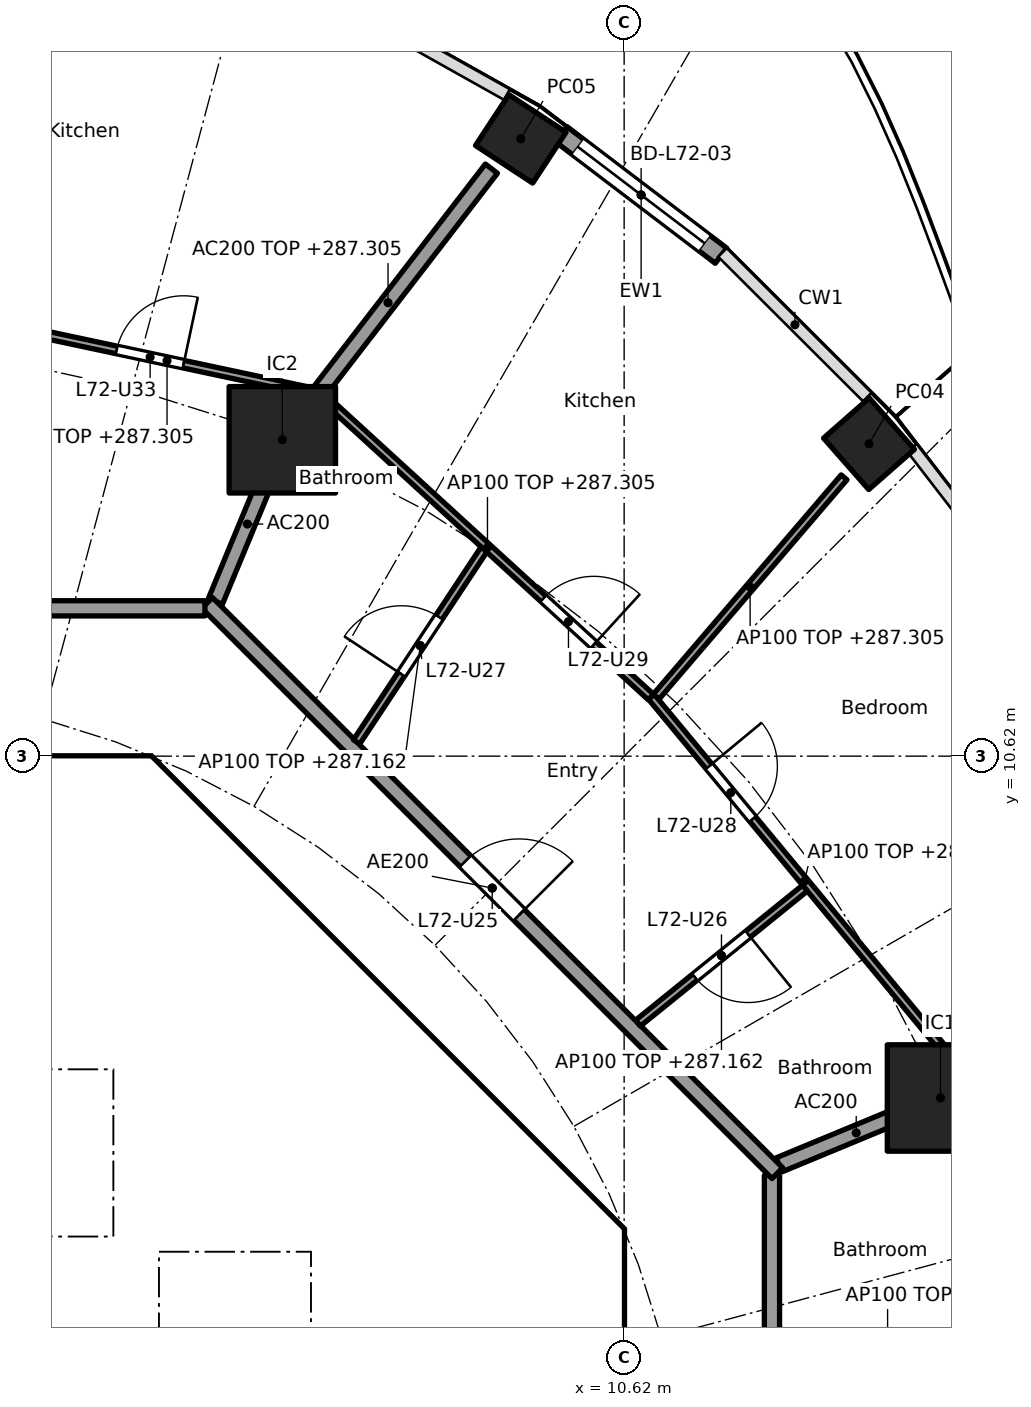
"""IFC4 building model, lengths in metres.
Left out: names, types, materials, properties, quantities, classifications, styles, units other than length and angle.
Written with IfcOpenShell. Run it as: python <this file> out.ifc"""

import sys

from ifc_helpers import new_model, si_unit, direction, frame, frame_2d, origin, origin_2d, place, context, subcontext, project, spatial, polyline, rectangle, hollow_rectangle, outline, extrude, element, fill, save


model = new_model("IFC4")
c1 = context("Model", 3, precision=1e-05, world=origin(), true_north=direction((0.0, 1.0)))
c2 = subcontext(c1, "Body", "Model", "MODEL_VIEW")
j1 = project(units=[si_unit("LENGTHUNIT", "METRE"), si_unit("PLANEANGLEUNIT", "RADIAN")], contexts=[c1])
p1 = place(None, origin())
s1 = spatial("IfcSite", under=j1, at=p1, CompositionType="ELEMENT")
p2 = place(p1, origin())
s2 = spatial("IfcBuilding", under=s1, at=p2, CompositionType="ELEMENT")
p3 = place(p2, frame((0.0, 0.0, 284.4)))
s3 = spatial("IfcBuildingStorey", under=s2, at=p3, CompositionType="ELEMENT", Elevation=284.4)
for number, where, z_axis, x_axis in (
    (1, (13.841, 14.73, 0.0), (0.0, 0.0, 1.0), (-0.66, 0.751, 0.0)),
    (2, (9.26, 18.741, 0.0), (0.0, 0.0, 1.0), (-0.836, 0.549, 0.0)),
):
    element("IfcColumn", number, at=place(p3, frame(where, z_axis=z_axis, x_axis=x_axis)), inside=s3, PredefinedType="COLUMN", context=c2, shape_type="SweptSolid", body=[
        extrude(hollow_rectangle(XDim=0.9, YDim=0.8, WallThickness=0.028, at=origin_2d()), origin(), (0.0, 0.0, 1.0), 3.7),
    ])
for number, where, z_axis, x_axis in (
    (3, (14.782, 6.123, 0.0), (0.0, 0.0, 1.0), (1.0, 0.0, 0.0)),
    (4, (6.123, 14.782, 0.0), (0.0, 0.0, 1.0), (1.0, 0.0, 0.0)),
):
    element("IfcColumn", number, at=place(p3, frame(where, z_axis=z_axis, x_axis=x_axis)), inside=s3, PredefinedType="COLUMN", context=c2, shape_type="SweptSolid", body=[
        extrude(rectangle(XDim=1.4, YDim=1.4, at=origin_2d()), origin(), (0.0, 0.0, 1.0), 3.7),
    ])
p4 = place(p3, frame((9.792, 18.802, 0.0), z_axis=(0.0, 0.0, 1.0), x_axis=(0.796010739377, -0.605282498339, 0.0)))
e5 = element("IfcWall", 5, at=p4, inside=s3, PredefinedType="SOLIDWALL", context=c2, shape_type="SweptSolid", body=[
    extrude(rectangle(XDim=2.641, YDim=0.25, at=frame_2d((1.32, 0.0))), origin(), (0.0, 0.0, 1.0), 3.44),
])
p5 = place(p4, frame((0.27, 0.0, 0.0)))
e6 = element("IfcOpeningElement", 6, at=p5, cuts=e5, PredefinedType="OPENING", context=c2, shape_type="SweptSolid", body=[
    extrude(rectangle(XDim=2.1, YDim=2.4, at=frame_2d((1.05, 1.2))), frame((0.0, 0.135, 0.0), z_axis=(0.0, -1.0, 0.0), x_axis=(1.0, 0.0, 0.0)), (0.0, 0.0, 1.0), 0.27),
])
p6 = place(p3, frame((9.988, 4.613, 0.0), z_axis=(0.0, 0.0, 1.0), x_axis=(-0.707106781187, 0.707106781187, 0.0)))
e7 = element("IfcWall", 7, at=p6, inside=s3, PredefinedType="SHEAR", context=c2, shape_type="SweptSolid", body=[
    extrude(rectangle(XDim=7.602, YDim=0.6, at=frame_2d((3.801, 0.0))), origin(), (0.0, 0.0, 1.0), 3.44),
])
p7 = place(p6, frame((3.201, 0.0, 0.0)))
e8 = element("IfcOpeningElement", 8, at=p7, cuts=e7, PredefinedType="OPENING", context=c2, shape_type="SweptSolid", body=[
    extrude(rectangle(XDim=1.2, YDim=2.1, at=frame_2d((0.6, 1.05))), frame((0.0, 0.31, 0.0), z_axis=(0.0, -1.0, 0.0), x_axis=(1.0, 0.0, 0.0)), (0.0, 0.0, 1.0), 0.62),
])
p8 = place(p3, frame((4.0, 4.3, 0.0), z_axis=(0.0, 0.0, 1.0), x_axis=(0.0, 1.0, 0.0)))
e9 = element("IfcWall", 9, at=p8, inside=s3, PredefinedType="SOLIDWALL", context=c2, shape_type="SweptSolid", body=[
    extrude(rectangle(XDim=2.2, YDim=0.2, at=frame_2d((1.1, 0.0))), origin(), (0.0, 0.0, 1.0), 3.44),
])
p9 = place(p8, frame((0.55, 0.0, 0.0)))
e10 = element("IfcOpeningElement", 10, at=p9, cuts=e9, PredefinedType="OPENING", context=c2, shape_type="SweptSolid", body=[
    extrude(rectangle(XDim=1.1, YDim=2.1, at=frame_2d((0.55, 1.05))), frame((0.0, 0.11, 0.0), z_axis=(0.0, -1.0, 0.0), x_axis=(1.0, 0.0, 0.0)), (0.0, 0.0, 1.0), 0.22),
])
p10 = place(p3, frame((6.7, 4.0, 0.0), z_axis=(0.0, 0.0, 1.0), x_axis=(1.0, 0.0, 0.0)))
e11 = element("IfcWall", 11, at=p10, inside=s3, PredefinedType="SOLIDWALL", context=c2, shape_type="SweptSolid", body=[
    extrude(rectangle(XDim=3.325, YDim=0.2, at=frame_2d((1.662, 0.0))), origin(), (0.0, 0.0, 1.0), 3.44),
])
p11 = place(p10, frame((1.25, 0.0, 0.0)))
e12 = element("IfcOpeningElement", 12, at=p11, cuts=e11, PredefinedType="OPENING", context=c2, shape_type="SweptSolid", body=[
    extrude(rectangle(XDim=1.1, YDim=2.1, at=frame_2d((0.55, 1.05))), frame((0.0, 0.11, 0.0), z_axis=(0.0, -1.0, 0.0), x_axis=(1.0, 0.0, 0.0)), (0.0, 0.0, 1.0), 0.22),
])
p12 = place(p3, frame((4.0, 7.025, 0.0), z_axis=(0.0, 0.0, 1.0), x_axis=(0.0, 1.0, 0.0)))
e13 = element("IfcWall", 13, at=p12, inside=s3, PredefinedType="SOLIDWALL", context=c2, shape_type="SweptSolid", body=[
    extrude(rectangle(XDim=3.0, YDim=0.2, at=frame_2d((1.5, 0.0))), origin(), (0.0, 0.0, 1.0), 3.44),
])
p13 = place(p12, frame((0.925, 0.0, 0.0)))
e14 = element("IfcOpeningElement", 14, at=p13, cuts=e13, PredefinedType="OPENING", context=c2, shape_type="SweptSolid", body=[
    extrude(rectangle(XDim=1.1, YDim=2.1, at=frame_2d((0.55, 1.05))), frame((0.0, 0.11, 0.0), z_axis=(0.0, -1.0, 0.0), x_axis=(1.0, 0.0, 0.0)), (0.0, 0.0, 1.0), 0.22),
])
p14 = place(p3, origin())
e15 = element("IfcWall", 15, at=p14, inside=s3, PredefinedType="SHEAR", context=c2, shape_type="SweptSolid", body=[
    extrude(outline(polyline([(-4.152, 10.025), (-4.401, 9.776), (-4.825, 10.2), (-4.401, 10.625), (4.401, 10.625), (4.825, 10.2), (4.401, 9.776), (4.152, 10.025), (-4.152, 10.025)])), origin(), (0.0, 0.0, 1.0), 3.44),
])
p15 = place(p3, origin())
e16 = element("IfcWall", 16, at=p15, inside=s3, PredefinedType="SHEAR", context=c2, shape_type="SweptSolid", body=[
    extrude(outline(polyline([(9.776, -4.401), (10.025, -4.152), (10.025, -3.801), (10.025, 4.152), (9.776, 4.401), (10.2, 4.825), (10.625, 4.401), (10.625, -4.401), (10.2, -4.825), (9.776, -4.401)])), origin(), (0.0, 0.0, 1.0), 3.44),
])
p16 = place(p3, origin())
e17 = element("IfcWall", 17, at=p16, inside=s3, PredefinedType="SOLIDWALL", context=c2, shape_type="SweptSolid", body=[
    extrude(outline(polyline([(-6.7, 4.3), (6.7, 4.3), (6.7, 2.1), (6.5, 2.1), (6.5, 4.1), (4.5, 4.1), (4.5, 2.1), (4.3, 2.1), (4.3, 4.1), (0.1, 4.1), (0.1, 2.1), (-0.1, 2.1), (-0.1, 4.1), (-2.1, 4.1), (-2.1, 2.1), (-2.3, 2.1), (-2.3, 4.1), (-6.5, 4.1), (-6.5, 2.1), (-6.7, 2.1), (-6.7, 4.3)])), origin(), (0.0, 0.0, 1.0), 3.44),
])
p17 = place(p3, origin())
e18 = element("IfcWall", 18, at=p17, inside=s3, PredefinedType="SOLIDWALL", context=c2, shape_type="SweptSolid", body=[
    extrude(outline(polyline([(4.1, 6.5), (-4.1, 6.5), (-4.1, 7.025), (4.1, 7.025), (4.1, 6.5)])), origin(), (0.0, 0.0, 1.0), 3.44),
])
p18 = place(p3, origin())
e19 = element("IfcWall", 19, at=p18, inside=s3, PredefinedType="SOLIDWALL", context=c2, shape_type="SweptSolid", body=[
    extrude(outline(polyline([(7.025, -3.9), (6.7, -3.9), (6.7, 3.9), (7.025, 3.9), (7.025, -3.9)])), origin(), (0.0, 0.0, 1.0), 3.44),
])
p19 = place(p3, frame((12.657, 5.243, 0.0), z_axis=(0.0, 0.0, 1.0), x_axis=(0.923853160736, 0.382747093259, 0.0)))
e20 = element("IfcWall", 20, at=p19, inside=s3, PredefinedType="PARTITIONING", context=c2, shape_type="SweptSolid", body=[
    extrude(rectangle(XDim=2.2, YDim=0.2, at=frame_2d((1.1, 0.0))), origin(), (0.0, 0.0, 1.0), 3.44),
])
p20 = place(p3, frame((14.814, 6.161, 0.0), z_axis=(0.0, 0.0, 1.0), x_axis=(0.638050520313, 0.769994502272, 0.0)))
e21 = element("IfcWall", 21, at=p20, inside=s3, PredefinedType="PARTITIONING", context=c2, shape_type="SweptSolid", body=[
    extrude(rectangle(XDim=3.673, YDim=0.2, at=frame_2d((1.836, 0.0))), origin(), (0.0, 0.0, 1.0), 3.44),
])
p21 = place(p3, frame((5.243, 12.657, 0.0), z_axis=(0.0, 0.0, 1.0), x_axis=(0.382691608661, 0.923876145736, 0.0)))
e22 = element("IfcWall", 22, at=p21, inside=s3, PredefinedType="PARTITIONING", context=c2, shape_type="SweptSolid", body=[
    extrude(rectangle(XDim=2.2, YDim=0.2, at=frame_2d((1.1, 0.0))), origin(), (0.0, 0.0, 1.0), 3.44),
])
p22 = place(p3, frame((6.154, 14.822, 0.0), z_axis=(0.0, 0.0, 1.0), x_axis=(0.610687612043, 0.791871606068, 0.0)))
e23 = element("IfcWall", 23, at=p22, inside=s3, PredefinedType="PARTITIONING", context=c2, shape_type="SweptSolid", body=[
    extrude(rectangle(XDim=4.455, YDim=0.2, at=frame_2d((2.228, 0.0))), origin(), (0.0, 0.0, 1.0), 2.905),
])
p23 = place(p3, frame((12.565, -5.104, 0.0), z_axis=(0.0, 0.0, 1.0), x_axis=(0.0, 1.0, 0.0)))
e24 = element("IfcWall", 24, at=p23, inside=s3, PredefinedType="PARTITIONING", context=c2, shape_type="SweptSolid", body=[
    extrude(rectangle(XDim=10.209, YDim=0.2, at=frame_2d((5.104, 0.0))), origin(), (0.0, 0.0, 1.0), 3.44),
])
p24 = place(p23, frame((4.604, 0.0, 0.0)))
e25 = element("IfcOpeningElement", 25, at=p24, cuts=e24, PredefinedType="OPENING", context=c2, shape_type="SweptSolid", body=[
    extrude(rectangle(XDim=1.0, YDim=2.1, at=frame_2d((0.5, 1.05))), frame((0.0, 0.11, 0.0), z_axis=(0.0, -1.0, 0.0), x_axis=(1.0, 0.0, 0.0)), (0.0, 0.0, 1.0), 0.22),
])
p25 = place(p3, frame((12.635, 5.134, 0.0), z_axis=(0.0, 0.0, 1.0), x_axis=(-0.707106781187, 0.707106781187, 0.0)))
e26 = element("IfcWall", 26, at=p25, inside=s3, PredefinedType="PARTITIONING", context=c2, shape_type="SweptSolid", body=[
    extrude(rectangle(XDim=10.609, YDim=0.2, at=frame_2d((5.305, 0.0))), origin(), (0.0, 0.0, 1.0), 3.44),
])
p26 = place(p25, frame((4.804, 0.0, 0.0)))
e27 = element("IfcOpeningElement", 27, at=p26, cuts=e26, PredefinedType="OPENING", context=c2, shape_type="SweptSolid", body=[
    extrude(rectangle(XDim=1.0, YDim=2.1, at=frame_2d((0.5, 1.05))), frame((0.0, 0.11, 0.0), z_axis=(0.0, -1.0, 0.0), x_axis=(1.0, 0.0, 0.0)), (0.0, 0.0, 1.0), 0.22),
])
p27 = place(p3, frame((5.104, 12.565, 0.0), z_axis=(0.0, 0.0, 1.0), x_axis=(-1.0, 0.0, 0.0)))
e28 = element("IfcWall", 28, at=p27, inside=s3, PredefinedType="PARTITIONING", context=c2, shape_type="SweptSolid", body=[
    extrude(rectangle(XDim=10.409, YDim=0.2, at=frame_2d((5.205, 0.0))), origin(), (0.0, 0.0, 1.0), 3.44),
])
p28 = place(p27, frame((6.339, 0.0, 0.0)))
e29 = element("IfcOpeningElement", 29, at=p28, cuts=e28, PredefinedType="OPENING", context=c2, shape_type="SweptSolid", body=[
    extrude(rectangle(XDim=1.0, YDim=2.1, at=frame_2d((0.5, 1.05))), frame((0.0, 0.11, 0.0), z_axis=(0.0, -1.0, 0.0), x_axis=(1.0, 0.0, 0.0)), (0.0, 0.0, 1.0), 0.22),
])
p29 = place(p3, frame((15.002, 6.543, 0.0), z_axis=(0.0, 0.0, 1.0), x_axis=(-0.637932656528, 0.770092154054, 0.0)))
e30 = element("IfcWall", 30, at=p29, inside=s3, PredefinedType="PARTITIONING", context=c2, shape_type="SweptSolid", body=[
    extrude(rectangle(XDim=6.311, YDim=0.1, at=frame_2d((3.155, 0.0))), origin(), (0.0, 0.0, 1.0), 2.905),
])
p30 = place(p29, frame((4.22, 0.0, 0.0)))
e31 = element("IfcOpeningElement", 31, at=p30, cuts=e30, PredefinedType="OPENING", context=c2, shape_type="SweptSolid", body=[
    extrude(rectangle(XDim=0.9, YDim=2.1, at=frame_2d((0.45, 1.05))), frame((0.0, 0.06, 0.0), z_axis=(0.0, -1.0, 0.0), x_axis=(1.0, 0.0, 0.0)), (0.0, 0.0, 1.0), 0.12),
])
p31 = place(p3, frame((10.802, 7.107, 0.0), z_axis=(0.0, 0.0, 1.0), x_axis=(0.777526610395, 0.628850037868, 0.0)))
e32 = element("IfcWall", 32, at=p31, inside=s3, PredefinedType="PARTITIONING", context=c2, shape_type="SweptSolid", body=[
    extrude(rectangle(XDim=2.824, YDim=0.1, at=frame_2d((1.412, 0.0))), origin(), (0.0, 0.0, 1.0), 2.762),
])
p32 = place(p31, frame((0.962, 0.0, 0.0)))
e33 = element("IfcOpeningElement", 33, at=p32, cuts=e32, PredefinedType="OPENING", context=c2, shape_type="SweptSolid", body=[
    extrude(rectangle(XDim=0.9, YDim=2.1, at=frame_2d((0.45, 1.05))), frame((0.0, 0.06, 0.0), z_axis=(0.0, -1.0, 0.0), x_axis=(1.0, 0.0, 0.0)), (0.0, 0.0, 1.0), 0.12),
])
p33 = place(p3, frame((11.041, 11.402, 0.0), z_axis=(0.0, 0.0, 1.0), x_axis=(0.650558544325, 0.759456108282, 0.0)))
e34 = element("IfcWall", 34, at=p33, inside=s3, PredefinedType="PARTITIONING", context=c2, shape_type="SweptSolid", body=[
    extrude(rectangle(XDim=3.8, YDim=0.1, at=frame_2d((1.9, 0.0))), origin(), (0.0, 0.0, 1.0), 2.905),
])
p34 = place(p3, frame((10.972, 11.398, 0.0), z_axis=(0.0, 0.0, 1.0), x_axis=(-0.737830272434, 0.674986288069, 0.0)))
e35 = element("IfcWall", 35, at=p34, inside=s3, PredefinedType="PARTITIONING", context=c2, shape_type="SweptSolid", body=[
    extrude(rectangle(XDim=5.827, YDim=0.1, at=frame_2d((2.914, 0.0))), origin(), (0.0, 0.0, 1.0), 2.905),
])
p35 = place(p34, frame((1.019, 0.0, 0.0)))
e36 = element("IfcOpeningElement", 36, at=p35, cuts=e35, PredefinedType="OPENING", context=c2, shape_type="SweptSolid", body=[
    extrude(rectangle(XDim=0.9, YDim=2.1, at=frame_2d((0.45, 1.05))), frame((0.0, 0.06, 0.0), z_axis=(0.0, -1.0, 0.0), x_axis=(1.0, 0.0, 0.0)), (0.0, 0.0, 1.0), 0.12),
])
p36 = place(p3, frame((7.1, 10.808, 0.0), z_axis=(0.0, 0.0, 1.0), x_axis=(0.55204370542, 0.833815175747, 0.0)))
e37 = element("IfcWall", 37, at=p36, inside=s3, PredefinedType="PARTITIONING", context=c2, shape_type="SweptSolid", body=[
    extrude(rectangle(XDim=3.036, YDim=0.1, at=frame_2d((1.518, 0.0))), origin(), (0.0, 0.0, 1.0), 2.762),
])
p37 = place(p36, frame((1.068, 0.0, 0.0)))
e38 = element("IfcOpeningElement", 38, at=p37, cuts=e37, PredefinedType="OPENING", context=c2, shape_type="SweptSolid", body=[
    extrude(rectangle(XDim=0.9, YDim=2.1, at=frame_2d((0.45, 1.05))), frame((0.0, 0.06, 0.0), z_axis=(0.0, -1.0, 0.0), x_axis=(1.0, 0.0, 0.0)), (0.0, 0.0, 1.0), 0.12),
])
p38 = place(p3, frame((6.5, 15.419, 0.0), z_axis=(0.0, 0.0, 1.0), x_axis=(-0.978053492557, 0.208353943321, 0.0)))
e39 = element("IfcWall", 39, at=p38, inside=s3, PredefinedType="PARTITIONING", context=c2, shape_type="SweptSolid", body=[
    extrude(rectangle(XDim=3.874, YDim=0.1, at=frame_2d((1.937, 0.0))), origin(), (0.0, 0.0, 1.0), 2.905),
])
p39 = place(p38, frame((1.714, 0.0, 0.0)))
e40 = element("IfcOpeningElement", 40, at=p39, cuts=e39, PredefinedType="OPENING", context=c2, shape_type="SweptSolid", body=[
    extrude(rectangle(XDim=0.9, YDim=2.1, at=frame_2d((0.45, 1.05))), frame((0.0, 0.06, 0.0), z_axis=(0.0, -1.0, 0.0), x_axis=(1.0, 0.0, 0.0)), (0.0, 0.0, 1.0), 0.12),
])
p40 = place(p5, origin())
e41 = element("IfcDoor", 41, at=p40, inside=s3, OperationType="SLIDING_TO_LEFT", PredefinedType="DOOR", context=c2, shape_type="SweptSolid", body=[
    extrude(rectangle(XDim=2.1, YDim=2.4, at=frame_2d((1.05, 1.2))), frame((0.0, 0.025, 0.0), z_axis=(0.0, -1.0, 0.0), x_axis=(1.0, 0.0, 0.0)), (0.0, 0.0, 1.0), 0.05),
])
fill(e6, e41)
p41 = place(p9, origin())
e42 = element("IfcDoor", 42, at=p41, inside=s3, OperationType="DOUBLE_DOOR_SLIDING", PredefinedType="DOOR", context=c2, shape_type="SweptSolid", body=[
    extrude(rectangle(XDim=1.1, YDim=2.1, at=frame_2d((0.55, 1.05))), frame((0.0, 0.025, 0.0), z_axis=(0.0, -1.0, 0.0), x_axis=(1.0, 0.0, 0.0)), (0.0, 0.0, 1.0), 0.05),
])
fill(e10, e42)
p42 = place(p11, frame((1.1, 0.0, 0.0), x_axis=(-1.0, 0.0, 0.0)))
e43 = element("IfcDoor", 43, at=p42, inside=s3, OperationType="SINGLE_SWING_LEFT", PredefinedType="DOOR", context=c2, shape_type="SweptSolid", body=[
    extrude(rectangle(XDim=1.1, YDim=2.1, at=frame_2d((0.55, 1.05))), frame((0.0, 0.025, 0.0), z_axis=(0.0, -1.0, 0.0), x_axis=(1.0, 0.0, 0.0)), (0.0, 0.0, 1.0), 0.05),
])
fill(e12, e43)
p43 = place(p13, origin())
e44 = element("IfcDoor", 44, at=p43, inside=s3, OperationType="SINGLE_SWING_RIGHT", PredefinedType="DOOR", context=c2, shape_type="SweptSolid", body=[
    extrude(rectangle(XDim=1.1, YDim=2.1, at=frame_2d((0.55, 1.05))), frame((0.0, 0.025, 0.0), z_axis=(0.0, -1.0, 0.0), x_axis=(1.0, 0.0, 0.0)), (0.0, 0.0, 1.0), 0.05),
])
fill(e14, e44)
p44 = place(p7, origin())
e45 = element("IfcDoor", 45, at=p44, inside=s3, OperationType="SINGLE_SWING_LEFT", PredefinedType="DOOR", context=c2, shape_type="SweptSolid", body=[
    extrude(rectangle(XDim=1.2, YDim=2.1, at=frame_2d((0.6, 1.05))), frame((0.0, 0.025, 0.0), z_axis=(0.0, -1.0, 0.0), x_axis=(1.0, 0.0, 0.0)), (0.0, 0.0, 1.0), 0.05),
])
fill(e8, e45)
p45 = place(p26, frame((1.0, 0.0, 0.0), x_axis=(-1.0, 0.0, 0.0)))
e46 = element("IfcDoor", 46, at=p45, inside=s3, OperationType="SINGLE_SWING_RIGHT", PredefinedType="DOOR", context=c2, shape_type="SweptSolid", body=[
    extrude(rectangle(XDim=1.0, YDim=2.1, at=frame_2d((0.5, 1.05))), frame((0.0, 0.025, 0.0), z_axis=(0.0, -1.0, 0.0), x_axis=(1.0, 0.0, 0.0)), (0.0, 0.0, 1.0), 0.05),
])
fill(e27, e46)
p46 = place(p32, frame((0.9, 0.0, 0.0), x_axis=(-1.0, 0.0, 0.0)))
e47 = element("IfcDoor", 47, at=p46, inside=s3, OperationType="SINGLE_SWING_LEFT", PredefinedType="DOOR", context=c2, shape_type="SweptSolid", body=[
    extrude(rectangle(XDim=0.9, YDim=2.1, at=frame_2d((0.45, 1.05))), frame((0.0, 0.025, 0.0), z_axis=(0.0, -1.0, 0.0), x_axis=(1.0, 0.0, 0.0)), (0.0, 0.0, 1.0), 0.05),
])
fill(e33, e47)
p47 = place(p37, origin())
e48 = element("IfcDoor", 48, at=p47, inside=s3, OperationType="SINGLE_SWING_LEFT", PredefinedType="DOOR", context=c2, shape_type="SweptSolid", body=[
    extrude(rectangle(XDim=0.9, YDim=2.1, at=frame_2d((0.45, 1.05))), frame((0.0, 0.025, 0.0), z_axis=(0.0, -1.0, 0.0), x_axis=(1.0, 0.0, 0.0)), (0.0, 0.0, 1.0), 0.05),
])
fill(e38, e48)
p48 = place(p30, frame((0.9, 0.0, 0.0), x_axis=(-1.0, 0.0, 0.0)))
e49 = element("IfcDoor", 49, at=p48, inside=s3, OperationType="SINGLE_SWING_LEFT", PredefinedType="DOOR", context=c2, shape_type="SweptSolid", body=[
    extrude(rectangle(XDim=0.9, YDim=2.1, at=frame_2d((0.45, 1.05))), frame((0.0, 0.025, 0.0), z_axis=(0.0, -1.0, 0.0), x_axis=(1.0, 0.0, 0.0)), (0.0, 0.0, 1.0), 0.05),
])
fill(e31, e49)
p49 = place(p35, frame((0.9, 0.0, 0.0), x_axis=(-1.0, 0.0, 0.0)))
e50 = element("IfcDoor", 50, at=p49, inside=s3, OperationType="SINGLE_SWING_RIGHT", PredefinedType="DOOR", context=c2, shape_type="SweptSolid", body=[
    extrude(rectangle(XDim=0.9, YDim=2.1, at=frame_2d((0.45, 1.05))), frame((0.0, 0.025, 0.0), z_axis=(0.0, -1.0, 0.0), x_axis=(1.0, 0.0, 0.0)), (0.0, 0.0, 1.0), 0.05),
])
fill(e36, e50)
p50 = place(p39, frame((0.9, 0.0, 0.0), x_axis=(-1.0, 0.0, 0.0)))
e51 = element("IfcDoor", 51, at=p50, inside=s3, OperationType="SINGLE_SWING_RIGHT", PredefinedType="DOOR", context=c2, shape_type="SweptSolid", body=[
    extrude(rectangle(XDim=0.9, YDim=2.1, at=frame_2d((0.45, 1.05))), frame((0.0, 0.025, 0.0), z_axis=(0.0, -1.0, 0.0), x_axis=(1.0, 0.0, 0.0)), (0.0, 0.0, 1.0), 0.05),
])
fill(e40, e51)
save(model, sys.argv[1])
